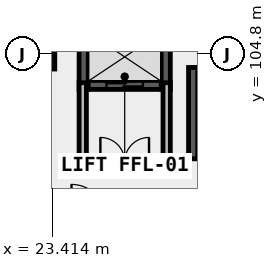
"""IFC4 building model, lengths in metres.
Left out: names, types, materials, properties, quantities, classifications, styles, units other than length and angle.
Written with IfcOpenShell. Run it as: python <this file> out.ifc"""

import sys

from ifc_helpers import new_model, si_unit, direction, frame, frame_2d, origin, origin_2d, place, context, subcontext, project, spatial, rectangle, extrude, element, fill, save


model = new_model("IFC4")
c1 = context("Model", 3, precision=1e-05, world=origin(), true_north=direction((0.0, 1.0)))
c2 = subcontext(c1, "Body", "Model", "MODEL_VIEW")
j1 = project(units=[si_unit("LENGTHUNIT", "METRE"), si_unit("PLANEANGLEUNIT", "RADIAN")], contexts=[c1])
p1 = place(None, origin())
s1 = spatial("IfcSite", under=j1, at=p1, CompositionType="ELEMENT")
p2 = place(p1, origin())
s2 = spatial("IfcBuilding", under=s1, at=p2, CompositionType="ELEMENT")
p3 = place(p2, origin())
s3 = spatial("IfcBuildingStorey", under=s2, at=p3, CompositionType="ELEMENT", Elevation=0.0)
p4 = place(p3, frame((23.0, 104.8, 0.0), z_axis=(0.0, 0.0, 1.0), x_axis=(1.0, 0.0, 0.0)))
e1 = element("IfcColumn", 1, at=p4, inside=s3, PredefinedType="COLUMN", context=c2, shape_type="SweptSolid", body=[
    extrude(rectangle(XDim=1.0, YDim=1.0, at=origin_2d()), origin(), (0.0, 0.0, 1.0), 4.2),
])
p5 = place(p3, frame((24.45, 103.78, 0.0), z_axis=(0.0, 0.0, 1.0), x_axis=(1.0, 0.0, 0.0)))
e2 = element("IfcWall", 2, at=p5, inside=s3, PredefinedType="SHEAR", context=c2, shape_type="SweptSolid", body=[
    extrude(rectangle(XDim=2.7, YDim=0.3, at=frame_2d((1.35, 0.0))), origin(), (0.0, 0.0, 1.0), 4.2),
])
p6 = place(p5, frame((0.75, 0.0, 0.0)))
e3 = element("IfcOpeningElement", 3, at=p6, cuts=e2, PredefinedType="OPENING", context=c2, shape_type="SweptSolid", body=[
    extrude(rectangle(XDim=1.2, YDim=2.15, at=frame_2d((0.6, 1.075))), frame((0.0, 0.16, 0.0), z_axis=(0.0, -1.0, 0.0), x_axis=(1.0, 0.0, 0.0)), (0.0, 0.0, 1.0), 0.32),
])
for number, where, z_axis, x_axis in (
    (4, (24.45, 103.63, 0.0), (0.0, 0.0, 1.0), (0.0, 1.0, 0.0)),
    (5, (27.15, 103.63, 0.0), (0.0, 0.0, 1.0), (0.0, 1.0, 0.0)),
):
    element("IfcWall", number, at=place(p3, frame(where, z_axis=z_axis, x_axis=x_axis)), inside=s3, PredefinedType="SHEAR", context=c2, shape_type="SweptSolid", body=[
        extrude(rectangle(XDim=2.14, YDim=0.3, at=frame_2d((1.07, 0.0))), origin(), (0.0, 0.0, 1.0), 4.2),
    ])
p7 = place(p3, frame((28.05, 101.5, 0.0), z_axis=(0.0, 0.0, 1.0), x_axis=(1.0, 0.0, 0.0)))
e6 = element("IfcWall", 6, at=p7, inside=s3, PredefinedType="SHEAR", context=c2, shape_type="SweptSolid", body=[
    extrude(rectangle(XDim=1.9, YDim=0.3, at=frame_2d((0.95, 0.0))), origin(), (0.0, 0.0, 1.0), 4.2),
])
p8 = place(p7, frame((0.4, 0.0, 0.0)))
e7 = element("IfcOpeningElement", 7, at=p8, cuts=e6, PredefinedType="OPENING", context=c2, shape_type="SweptSolid", body=[
    extrude(rectangle(XDim=1.1, YDim=2.15, at=frame_2d((0.55, 1.075))), frame((0.0, 0.16, 0.0), z_axis=(0.0, -1.0, 0.0), x_axis=(1.0, 0.0, 0.0)), (0.0, 0.0, 1.0), 0.32),
])
p9 = place(p3, frame((28.05, 104.2, 0.0), z_axis=(0.0, 0.0, 1.0), x_axis=(1.0, 0.0, 0.0)))
e8 = element("IfcWall", 8, at=p9, inside=s3, PredefinedType="SHEAR", context=c2, shape_type="SweptSolid", body=[
    extrude(rectangle(XDim=1.9, YDim=0.3, at=frame_2d((0.95, 0.0))), origin(), (0.0, 0.0, 1.0), 4.2),
])
p10 = place(p3, frame((28.05, 101.35, 0.0), z_axis=(0.0, 0.0, 1.0), x_axis=(0.0, 1.0, 0.0)))
e9 = element("IfcWall", 9, at=p10, inside=s3, PredefinedType="SHEAR", context=c2, shape_type="SweptSolid", body=[
    extrude(rectangle(XDim=3.0, YDim=0.3, at=frame_2d((1.5, 0.0))), origin(), (0.0, 0.0, 1.0), 4.2),
])
p11 = place(p3, frame((24.42, 101.25, 0.0), z_axis=(0.0, 0.0, 1.0), x_axis=(1.0, 0.0, 0.0)))
e10 = element("IfcWall", 10, at=p11, inside=s3, PredefinedType="SOLIDWALL", context=c2, shape_type="SweptSolid", body=[
    extrude(rectangle(XDim=2.76, YDim=0.24, at=frame_2d((1.38, 0.0))), origin(), (0.0, 0.0, 1.0), 3.88),
])
p12 = place(p11, frame((0.58, 0.0, 0.0)))
e11 = element("IfcOpeningElement", 11, at=p12, cuts=e10, PredefinedType="OPENING", context=c2, shape_type="SweptSolid", body=[
    extrude(rectangle(XDim=1.6, YDim=2.15, at=frame_2d((0.8, 1.075))), frame((0.0, 0.13, 0.0), z_axis=(0.0, -1.0, 0.0), x_axis=(1.0, 0.0, 0.0)), (0.0, 0.0, 1.0), 0.26),
])
for number, where, z_axis, x_axis in (
    (12, (24.42, 101.25, 0.0), (0.0, 0.0, 1.0), (0.0, 1.0, 0.0)),
    (13, (27.18, 101.25, 0.0), (0.0, 0.0, 1.0), (0.0, 1.0, 0.0)),
):
    element("IfcWall", number, at=place(p3, frame(where, z_axis=z_axis, x_axis=x_axis)), inside=s3, PredefinedType="SOLIDWALL", context=c2, shape_type="SweptSolid", body=[
        extrude(rectangle(XDim=2.6, YDim=0.24, at=frame_2d((1.3, 0.0))), origin(), (0.0, 0.0, 1.0), 3.88),
    ])
p13 = place(p6, origin())
e14 = element("IfcDoor", 14, at=p13, inside=s3, OperationType="SLIDING_TO_RIGHT", PredefinedType="DOOR", context=c2, shape_type="SweptSolid", body=[
    extrude(rectangle(XDim=1.2, YDim=2.15, at=frame_2d((0.6, 1.075))), frame((0.0, 0.025, 0.0), z_axis=(0.0, -1.0, 0.0), x_axis=(1.0, 0.0, 0.0)), (0.0, 0.0, 1.0), 0.05),
])
fill(e3, e14)
p14 = place(p12, origin())
e15 = element("IfcDoor", 15, at=p14, inside=s3, OperationType="DOUBLE_DOOR_SINGLE_SWING", PredefinedType="DOOR", context=c2, shape_type="SweptSolid", body=[
    extrude(rectangle(XDim=1.6, YDim=2.15, at=frame_2d((0.8, 1.075))), frame((0.0, 0.025, 0.0), z_axis=(0.0, -1.0, 0.0), x_axis=(1.0, 0.0, 0.0)), (0.0, 0.0, 1.0), 0.05),
])
fill(e11, e15)
save(model, sys.argv[1])
